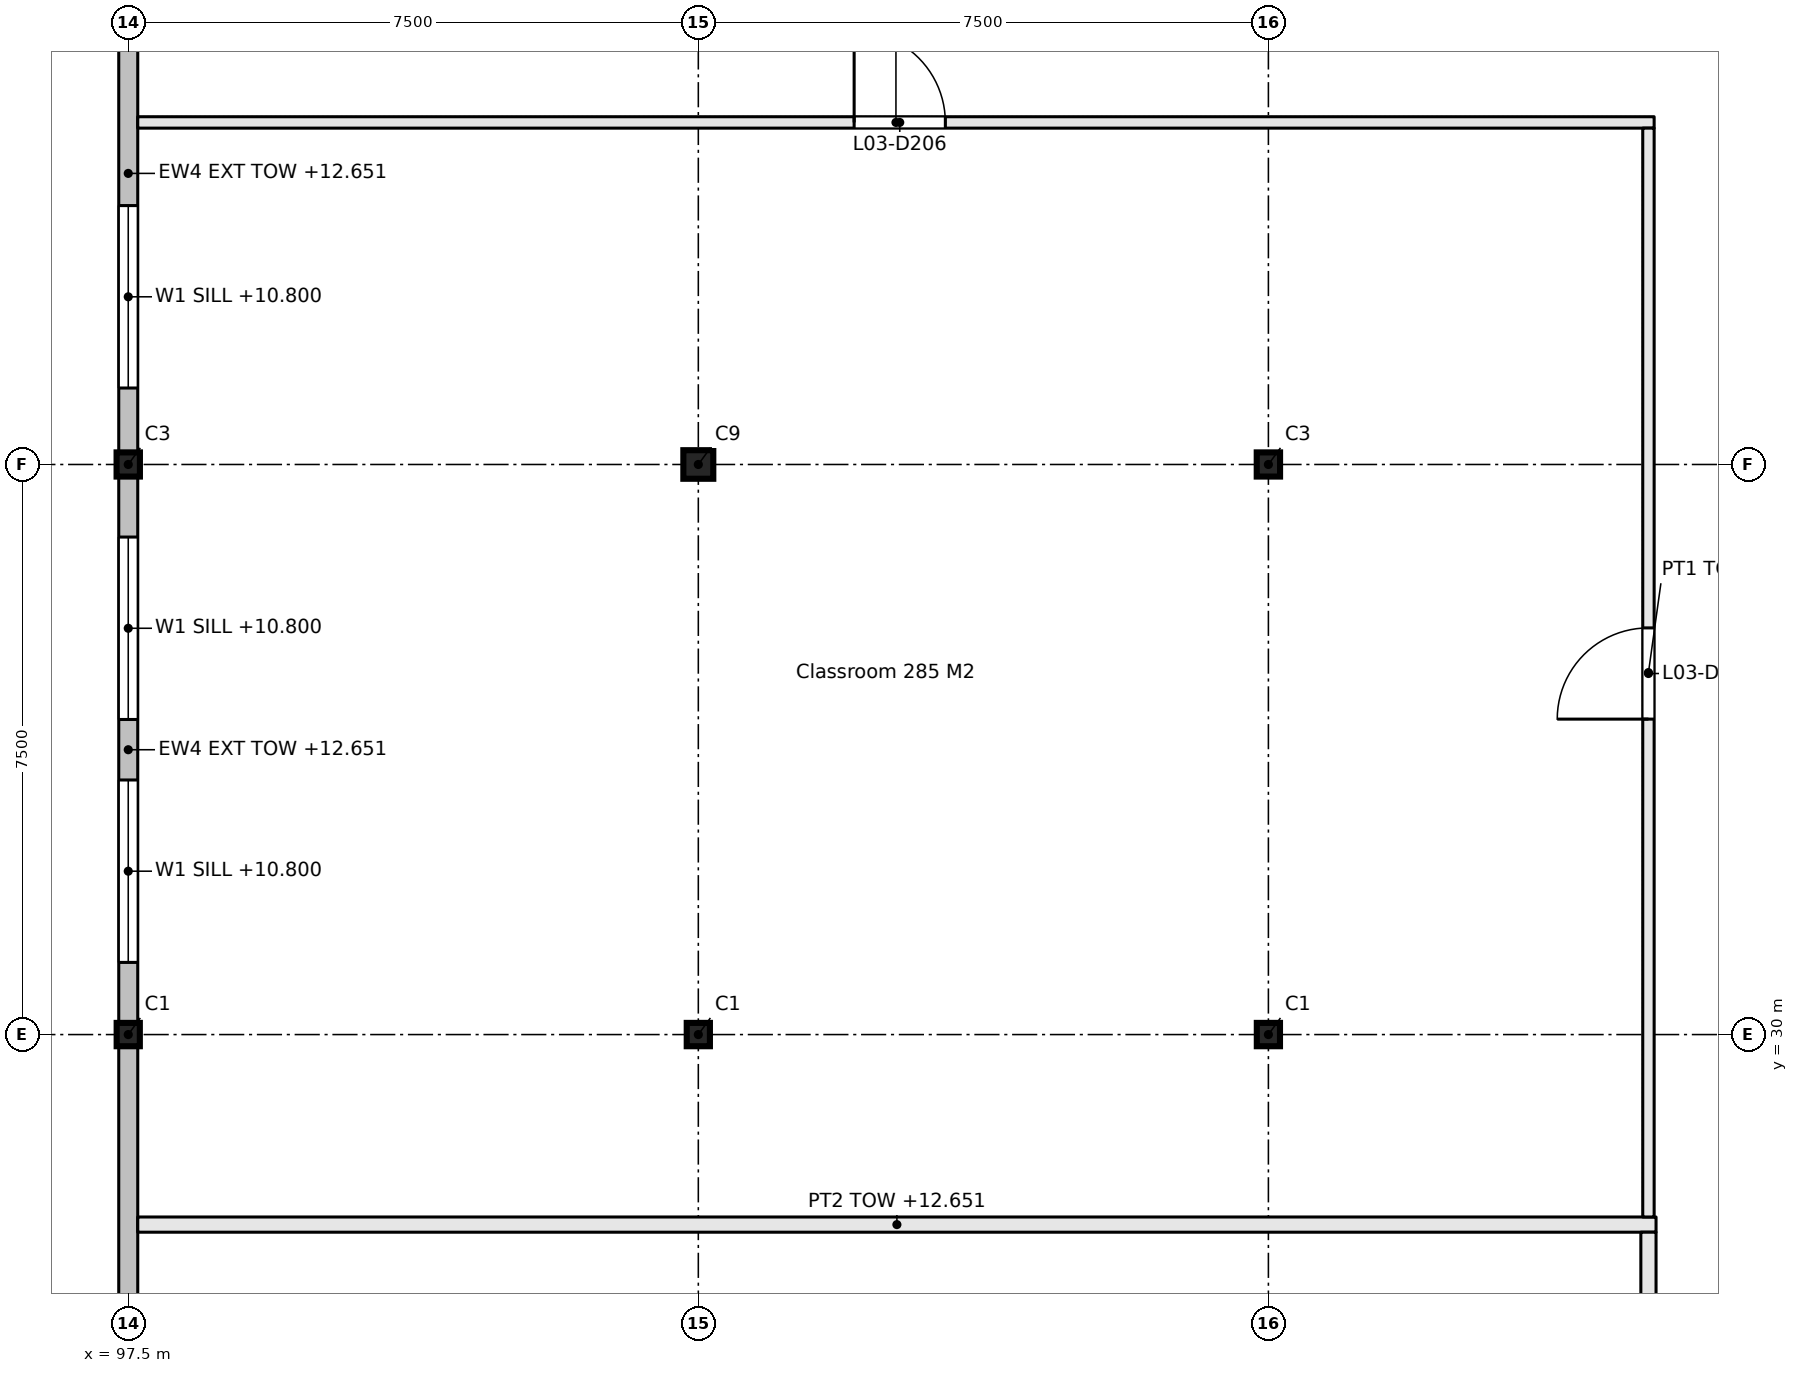
"""IFC4 building model, lengths in metres.
Left out: names, types, materials, properties, quantities, classifications, styles, units other than length and angle.
Written with IfcOpenShell. Run it as: python <this file> out.ifc"""

import sys

from ifc_helpers import new_model, si_unit, direction, frame, frame_2d, origin, origin_2d, place, context, subcontext, project, spatial, rectangle, i_section, extrude, element, fill, save


model = new_model("IFC4")
c1 = context("Model", 3, precision=1e-05, world=origin(), true_north=direction((0.0, 1.0)))
c2 = subcontext(c1, "Body", "Model", "MODEL_VIEW")
j1 = project(units=[si_unit("LENGTHUNIT", "METRE"), si_unit("PLANEANGLEUNIT", "RADIAN")], contexts=[c1])
p1 = place(None, origin())
s1 = spatial("IfcSite", under=j1, at=p1, CompositionType="ELEMENT")
p2 = place(p1, origin())
s2 = spatial("IfcBuilding", under=s1, at=p2, CompositionType="ELEMENT")
p3 = place(p2, frame((0.0, 0.0, 9.9)))
s3 = spatial("IfcBuildingStorey", under=s2, at=p3, CompositionType="ELEMENT", Elevation=9.9)
p4 = place(p3, frame((97.5, 30.0, 0.0), z_axis=(0.0, 0.0, 1.0), x_axis=(1.0, 0.0, 0.0)))
e1 = element("IfcColumn", 1, at=p4, inside=s3, PredefinedType="COLUMN", context=c2, shape_type="SweptSolid", body=[
    extrude(i_section(OverallWidth=0.305, OverallDepth=0.307, WebThickness=0.01, FlangeThickness=0.015, FilletRadius=0.015, at=origin_2d()), origin(), (0.0, 0.0, 1.0), 3.3),
])
p5 = place(p3, frame((97.5, 37.5, 0.0), z_axis=(0.0, 0.0, 1.0), x_axis=(1.0, 0.0, 0.0)))
e2 = element("IfcColumn", 2, at=p5, inside=s3, PredefinedType="COLUMN", context=c2, shape_type="SweptSolid", body=[
    extrude(i_section(OverallWidth=0.307, OverallDepth=0.318, WebThickness=0.013, FlangeThickness=0.021, FilletRadius=0.015, at=origin_2d()), origin(), (0.0, 0.0, 1.0), 3.3),
])
p6 = place(p3, frame((105.0, 30.0, 0.0), z_axis=(0.0, 0.0, 1.0), x_axis=(1.0, 0.0, 0.0)))
e3 = element("IfcColumn", 3, at=p6, inside=s3, PredefinedType="COLUMN", context=c2, shape_type="SweptSolid", body=[
    extrude(i_section(OverallWidth=0.305, OverallDepth=0.307, WebThickness=0.01, FlangeThickness=0.015, FilletRadius=0.015, at=origin_2d()), origin(), (0.0, 0.0, 1.0), 3.3),
])
p7 = place(p3, frame((105.0, 37.5, 0.0), z_axis=(0.0, 0.0, 1.0), x_axis=(1.0, 0.0, 0.0)))
e4 = element("IfcColumn", 4, at=p7, inside=s3, PredefinedType="COLUMN", context=c2, shape_type="SweptSolid", body=[
    extrude(i_section(OverallWidth=0.394, OverallDepth=0.376, WebThickness=0.017, FlangeThickness=0.028, FilletRadius=0.015, at=origin_2d()), origin(), (0.0, 0.0, 1.0), 3.3),
])
p8 = place(p3, frame((112.5, 30.0, 0.0), z_axis=(0.0, 0.0, 1.0), x_axis=(1.0, 0.0, 0.0)))
e5 = element("IfcColumn", 5, at=p8, inside=s3, PredefinedType="COLUMN", context=c2, shape_type="SweptSolid", body=[
    extrude(i_section(OverallWidth=0.305, OverallDepth=0.307, WebThickness=0.01, FlangeThickness=0.015, FilletRadius=0.015, at=origin_2d()), origin(), (0.0, 0.0, 1.0), 3.3),
])
p9 = place(p3, frame((112.5, 37.5, 0.0), z_axis=(0.0, 0.0, 1.0), x_axis=(1.0, 0.0, 0.0)))
e6 = element("IfcColumn", 6, at=p9, inside=s3, PredefinedType="COLUMN", context=c2, shape_type="SweptSolid", body=[
    extrude(i_section(OverallWidth=0.307, OverallDepth=0.318, WebThickness=0.013, FlangeThickness=0.021, FilletRadius=0.015, at=origin_2d()), origin(), (0.0, 0.0, 1.0), 3.3),
])
p10 = place(p3, frame((97.625, 27.5, 0.0), z_axis=(0.0, 0.0, 1.0), x_axis=(1.0, 0.0, 0.0)))
e7 = element("IfcWall", 7, at=p10, inside=s3, PredefinedType="PARTITIONING", context=c2, shape_type="SweptSolid", body=[
    extrude(rectangle(XDim=19.975, YDim=0.2, at=frame_2d((9.988, 0.0))), origin(), (0.0, 0.0, 1.0), 2.751),
])
p11 = place(p3, frame((97.625, 42.0, 0.0), z_axis=(0.0, 0.0, 1.0), x_axis=(1.0, 0.0, 0.0)))
e8 = element("IfcWall", 8, at=p11, inside=s3, PredefinedType="PARTITIONING", context=c2, shape_type="SweptSolid", body=[
    extrude(rectangle(XDim=19.95, YDim=0.15, at=frame_2d((9.975, 0.0))), origin(), (0.0, 0.0, 1.0), 2.751),
])
p12 = place(p11, frame((9.425, 0.0, 0.0)))
e9 = element("IfcOpeningElement", 9, at=p12, cuts=e8, PredefinedType="OPENING", context=c2, shape_type="SweptSolid", body=[
    extrude(rectangle(XDim=1.2, YDim=2.1, at=frame_2d((0.6, 1.05))), frame((0.0, 0.085, 0.0), z_axis=(0.0, -1.0, 0.0), x_axis=(1.0, 0.0, 0.0)), (0.0, 0.0, 1.0), 0.17),
])
p13 = place(p3, frame((117.5, 7.625, 0.0), z_axis=(0.0, 0.0, 1.0), x_axis=(0.0, 1.0, 0.0)))
e10 = element("IfcWall", 10, at=p13, inside=s3, PredefinedType="PARTITIONING", context=c2, shape_type="SweptSolid", body=[
    extrude(rectangle(XDim=19.775, YDim=0.2, at=frame_2d((9.887, 0.0))), origin(), (0.0, 0.0, 1.0), 2.627),
])
p14 = place(p13, frame((9.175, 0.0, 0.0)))
e11 = element("IfcOpeningElement", 11, at=p14, cuts=e10, PredefinedType="OPENING", context=c2, shape_type="SweptSolid", body=[
    extrude(rectangle(XDim=1.2, YDim=2.1, at=frame_2d((0.6, 1.05))), frame((0.0, 0.11, 0.0), z_axis=(0.0, -1.0, 0.0), x_axis=(1.0, 0.0, 0.0)), (0.0, 0.0, 1.0), 0.22),
])
p15 = place(p3, frame((117.5, 27.6, 0.0), z_axis=(0.0, 0.0, 1.0), x_axis=(0.0, 1.0, 0.0)))
e12 = element("IfcWall", 12, at=p15, inside=s3, PredefinedType="PARTITIONING", context=c2, shape_type="SweptSolid", body=[
    extrude(rectangle(XDim=14.325, YDim=0.15, at=frame_2d((7.163, 0.0))), origin(), (0.0, 0.0, 1.0), 2.627),
])
p16 = place(p15, frame((6.55, 0.0, 0.0)))
e13 = element("IfcOpeningElement", 13, at=p16, cuts=e12, PredefinedType="OPENING", context=c2, shape_type="SweptSolid", body=[
    extrude(rectangle(XDim=1.2, YDim=2.1, at=frame_2d((0.6, 1.05))), frame((0.0, 0.085, 0.0), z_axis=(0.0, -1.0, 0.0), x_axis=(1.0, 0.0, 0.0)), (0.0, 0.0, 1.0), 0.17),
])
p17 = place(p3, frame((97.5, 22.654, 0.0), z_axis=(0.0, 0.0, 1.0), x_axis=(0.0, 1.0, 0.0)))
e14 = element("IfcWall", 14, at=p17, inside=s3, PredefinedType="SOLIDWALL", context=c2, shape_type="SweptSolid", body=[
    extrude(rectangle(XDim=7.193, YDim=0.25, at=frame_2d((3.596, 0.0))), origin(), (0.0, 0.0, 1.0), 2.751),
])
p18 = place(p17, frame((0.798, 0.0, 1.6)))
e15 = element("IfcOpeningElement", 15, at=p18, cuts=e14, PredefinedType="OPENING", context=c2, shape_type="SweptSolid", body=[
    extrude(rectangle(XDim=2.4, YDim=0.9, at=frame_2d((1.2, 0.45))), frame((0.0, 0.135, 0.0), z_axis=(0.0, -1.0, 0.0), x_axis=(1.0, 0.0, 0.0)), (0.0, 0.0, 1.0), 0.27),
])
p19 = place(p3, frame((97.5, 30.154, 0.0), z_axis=(0.0, 0.0, 1.0), x_axis=(0.0, 1.0, 0.0)))
e16 = element("IfcWall", 16, at=p19, inside=s3, PredefinedType="SOLIDWALL", context=c2, shape_type="SweptSolid", body=[
    extrude(rectangle(XDim=7.188, YDim=0.25, at=frame_2d((3.594, 0.0))), origin(), (0.0, 0.0, 1.0), 2.751),
])
p20 = place(p19, frame((0.796, 0.0, 0.9)))
e17 = element("IfcOpeningElement", 17, at=p20, cuts=e16, PredefinedType="OPENING", context=c2, shape_type="SweptSolid", body=[
    extrude(rectangle(XDim=2.4, YDim=1.5, at=frame_2d((1.2, 0.75))), frame((0.0, 0.135, 0.0), z_axis=(0.0, -1.0, 0.0), x_axis=(1.0, 0.0, 0.0)), (0.0, 0.0, 1.0), 0.27),
])
p21 = place(p19, frame((3.992, 0.0, 0.9)))
e18 = element("IfcOpeningElement", 18, at=p21, cuts=e16, PredefinedType="OPENING", context=c2, shape_type="SweptSolid", body=[
    extrude(rectangle(XDim=2.4, YDim=1.5, at=frame_2d((1.2, 0.75))), frame((0.0, 0.135, 0.0), z_axis=(0.0, -1.0, 0.0), x_axis=(1.0, 0.0, 0.0)), (0.0, 0.0, 1.0), 0.27),
])
p22 = place(p3, frame((97.5, 37.659, 0.0), z_axis=(0.0, 0.0, 1.0), x_axis=(0.0, 1.0, 0.0)))
e19 = element("IfcWall", 19, at=p22, inside=s3, PredefinedType="SOLIDWALL", context=c2, shape_type="SweptSolid", body=[
    extrude(rectangle(XDim=7.341, YDim=0.25, at=frame_2d((3.67, 0.0))), origin(), (0.0, 0.0, 1.0), 2.751),
])
p23 = place(p22, frame((0.847, 0.0, 0.9)))
e20 = element("IfcOpeningElement", 20, at=p23, cuts=e19, PredefinedType="OPENING", context=c2, shape_type="SweptSolid", body=[
    extrude(rectangle(XDim=2.4, YDim=1.5, at=frame_2d((1.2, 0.75))), frame((0.0, 0.135, 0.0), z_axis=(0.0, -1.0, 0.0), x_axis=(1.0, 0.0, 0.0)), (0.0, 0.0, 1.0), 0.27),
])
p24 = place(p16, origin())
e21 = element("IfcDoor", 21, at=p24, inside=s3, OperationType="DOUBLE_DOOR_SINGLE_SWING", PredefinedType="DOOR", context=c2, shape_type="SweptSolid", body=[
    extrude(rectangle(XDim=1.2, YDim=2.1, at=frame_2d((0.6, 1.05))), frame((0.0, 0.025, 0.0), z_axis=(0.0, -1.0, 0.0), x_axis=(1.0, 0.0, 0.0)), (0.0, 0.0, 1.0), 0.05),
])
fill(e13, e21)
p25 = place(p12, origin())
e22 = element("IfcDoor", 22, at=p25, inside=s3, OperationType="DOUBLE_DOOR_SINGLE_SWING", PredefinedType="DOOR", context=c2, shape_type="SweptSolid", body=[
    extrude(rectangle(XDim=1.2, YDim=2.1, at=frame_2d((0.6, 1.05))), frame((0.0, 0.025, 0.0), z_axis=(0.0, -1.0, 0.0), x_axis=(1.0, 0.0, 0.0)), (0.0, 0.0, 1.0), 0.05),
])
fill(e9, e22)
p26 = place(p20, origin())
e23 = element("IfcWindow", 23, at=p26, inside=s3, PartitioningType="DOUBLE_PANEL_VERTICAL", PredefinedType="WINDOW", context=c2, shape_type="SweptSolid", body=[
    extrude(rectangle(XDim=2.4, YDim=1.5, at=frame_2d((1.2, 0.75))), frame((0.0, 0.03, 0.0), z_axis=(0.0, -1.0, 0.0), x_axis=(1.0, 0.0, 0.0)), (0.0, 0.0, 1.0), 0.06),
])
fill(e17, e23)
p27 = place(p21, origin())
e24 = element("IfcWindow", 24, at=p27, inside=s3, PartitioningType="DOUBLE_PANEL_VERTICAL", PredefinedType="WINDOW", context=c2, shape_type="SweptSolid", body=[
    extrude(rectangle(XDim=2.4, YDim=1.5, at=frame_2d((1.2, 0.75))), frame((0.0, 0.03, 0.0), z_axis=(0.0, -1.0, 0.0), x_axis=(1.0, 0.0, 0.0)), (0.0, 0.0, 1.0), 0.06),
])
fill(e18, e24)
p28 = place(p23, origin())
e25 = element("IfcWindow", 25, at=p28, inside=s3, PartitioningType="DOUBLE_PANEL_VERTICAL", PredefinedType="WINDOW", context=c2, shape_type="SweptSolid", body=[
    extrude(rectangle(XDim=2.4, YDim=1.5, at=frame_2d((1.2, 0.75))), frame((0.0, 0.03, 0.0), z_axis=(0.0, -1.0, 0.0), x_axis=(1.0, 0.0, 0.0)), (0.0, 0.0, 1.0), 0.06),
])
fill(e20, e25)
save(model, sys.argv[1])
